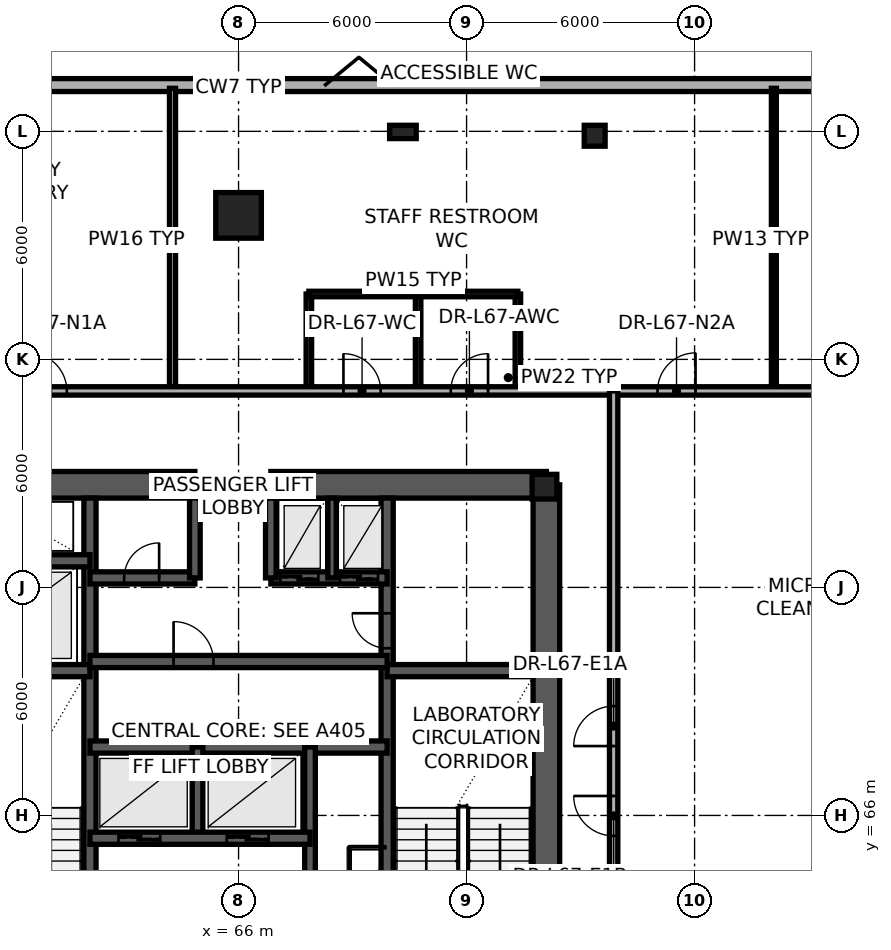
"""IFC4 building model, lengths in metres.
Left out: names, types, materials, properties, quantities, classifications, styles, units other than length and angle.
Written with IfcOpenShell. Run it as: python <this file> out.ifc"""

import sys

from ifc_helpers import new_model, si_unit, direction, frame, frame_2d, origin, origin_2d, place, context, subcontext, project, spatial, rectangle, extrude, element, fill, save


model = new_model("IFC4")
c1 = context("Model", 3, precision=1e-05, world=origin(), true_north=direction((0.0, 1.0)))
c2 = subcontext(c1, "Body", "Model", "MODEL_VIEW")
j1 = project(units=[si_unit("LENGTHUNIT", "METRE"), si_unit("PLANEANGLEUNIT", "RADIAN")], contexts=[c1])
p1 = place(None, origin())
s1 = spatial("IfcSite", under=j1, at=p1, CompositionType="ELEMENT")
p2 = place(p1, origin())
s2 = spatial("IfcBuilding", under=s1, at=p2, CompositionType="ELEMENT")
p3 = place(p2, frame((0.0, 0.0, 253.5)))
s3 = spatial("IfcBuildingStorey", under=s2, at=p3, CompositionType="ELEMENT", Elevation=253.5)
p4 = place(p3, frame((74.1, 61.3, 0.0), z_axis=(0.0, 0.0, 1.0), x_axis=(0.0, 1.0, 0.0)))
e1 = element("IfcWall", 1, at=p4, inside=s3, PredefinedType="SHEAR", context=c2, shape_type="SweptSolid", body=[
    extrude(rectangle(XDim=13.4, YDim=0.7, at=frame_2d((6.7, 0.0))), origin(), (0.0, 0.0, 1.0), 3.65),
])
p5 = place(p3, frame((74.1, 74.7, 0.0), z_axis=(0.0, 0.0, 1.0), x_axis=(-1.0, 0.0, 0.0)))
e2 = element("IfcWall", 2, at=p5, inside=s3, PredefinedType="SHEAR", context=c2, shape_type="SweptSolid", body=[
    extrude(rectangle(XDim=7.25, YDim=0.7, at=frame_2d((3.625, 0.0))), origin(), (0.0, 0.0, 1.0), 3.65),
])
p6 = place(p3, frame((64.85, 74.7, 0.0), z_axis=(0.0, 0.0, 1.0), x_axis=(-1.0, 0.0, 0.0)))
e3 = element("IfcWall", 3, at=p6, inside=s3, PredefinedType="SHEAR", context=c2, shape_type="SweptSolid", body=[
    extrude(rectangle(XDim=6.95, YDim=0.7, at=frame_2d((3.475, 0.0))), origin(), (0.0, 0.0, 1.0), 3.65),
])
p7 = place(p3, frame((62.09, 61.65, 0.0), z_axis=(0.0, 0.0, 1.0), x_axis=(0.0, 1.0, 0.0)))
e4 = element("IfcWall", 4, at=p7, inside=s3, PredefinedType="SHEAR", context=c2, shape_type="SweptSolid", body=[
    extrude(rectangle(XDim=12.7, YDim=0.32, at=frame_2d((6.35, 0.0))), origin(), (0.0, 0.0, 1.0), 3.65),
])
p8 = place(p7, frame((0.55, 0.0, 0.0)))
e5 = element("IfcOpeningElement", 5, at=p8, cuts=e4, PredefinedType="OPENING", context=c2, shape_type="SweptSolid", body=[
    extrude(rectangle(XDim=1.15, YDim=2.15, at=frame_2d((0.575, 1.075))), frame((0.0, 0.17, 0.0), z_axis=(0.0, -1.0, 0.0), x_axis=(1.0, 0.0, 0.0)), (0.0, 0.0, 1.0), 0.34),
])
p9 = place(p3, frame((69.91, 61.65, 0.0), z_axis=(0.0, 0.0, 1.0), x_axis=(0.0, 1.0, 0.0)))
e6 = element("IfcWall", 6, at=p9, inside=s3, PredefinedType="SHEAR", context=c2, shape_type="SweptSolid", body=[
    extrude(rectangle(XDim=12.7, YDim=0.32, at=frame_2d((6.35, 0.0))), origin(), (0.0, 0.0, 1.0), 3.65),
])
p10 = place(p9, frame((8.75, 0.0, 0.0)))
e7 = element("IfcOpeningElement", 7, at=p10, cuts=e6, PredefinedType="OPENING", context=c2, shape_type="SweptSolid", body=[
    extrude(rectangle(XDim=0.92, YDim=2.05, at=frame_2d((0.46, 1.025))), frame((0.0, 0.17, 0.0), z_axis=(0.0, -1.0, 0.0), x_axis=(1.0, 0.0, 0.0)), (0.0, 0.0, 1.0), 0.34),
])
for number, where, z_axis, x_axis in (
    (8, (58.25, 69.81, 0.0), (0.0, 0.0, 1.0), (1.0, 0.0, 0.0)),
    (9, (69.91, 69.81, 0.0), (0.0, 0.0, 1.0), (1.0, 0.0, 0.0)),
    (10, (58.25, 72.7, 0.0), (0.0, 0.0, 1.0), (1.0, 0.0, 0.0)),
):
    element("IfcWall", number, at=place(p3, frame(where, z_axis=z_axis, x_axis=x_axis)), inside=s3, PredefinedType="SHEAR", context=c2, shape_type="SweptSolid", body=[
        extrude(rectangle(XDim=3.84, YDim=0.32, at=frame_2d((1.92, 0.0))), origin(), (0.0, 0.0, 1.0), 3.65),
    ])
p11 = place(p3, frame((62.09, 67.8, 0.0), z_axis=(0.0, 0.0, 1.0), x_axis=(1.0, 0.0, 0.0)))
e11 = element("IfcWall", 11, at=p11, inside=s3, PredefinedType="SHEAR", context=c2, shape_type="SweptSolid", body=[
    extrude(rectangle(XDim=7.82, YDim=0.32, at=frame_2d((3.91, 0.0))), origin(), (0.0, 0.0, 1.0), 3.65),
])
p12 = place(p3, frame((64.92, 65.4, 0.0), z_axis=(0.0, 0.0, 1.0), x_axis=(0.0, 1.0, 0.0)))
e12 = element("IfcWall", 12, at=p12, inside=s3, PredefinedType="SHEAR", context=c2, shape_type="SweptSolid", body=[
    extrude(rectangle(XDim=2.4, YDim=0.28, at=frame_2d((1.2, 0.0))), origin(), (0.0, 0.0, 1.0), 3.65),
])
p13 = place(p3, frame((62.09, 70.05, 0.0), z_axis=(0.0, 0.0, 1.0), x_axis=(1.0, 0.0, 0.0)))
e13 = element("IfcWall", 13, at=p13, inside=s3, PredefinedType="SHEAR", context=c2, shape_type="SweptSolid", body=[
    extrude(rectangle(XDim=7.82, YDim=0.32, at=frame_2d((3.91, 0.0))), origin(), (0.0, 0.0, 1.0), 3.65),
])
p14 = place(p13, frame((2.2, 0.0, 0.0)))
e14 = element("IfcOpeningElement", 14, at=p14, cuts=e13, PredefinedType="OPENING", context=c2, shape_type="SweptSolid", body=[
    extrude(rectangle(XDim=1.05, YDim=2.15, at=frame_2d((0.525, 1.075))), frame((0.0, 0.17, 0.0), z_axis=(0.0, -1.0, 0.0), x_axis=(1.0, 0.0, 0.0)), (0.0, 0.0, 1.0), 0.34),
])
p15 = place(p3, frame((62.09, 72.25, 0.0), z_axis=(0.0, 0.0, 1.0), x_axis=(1.0, 0.0, 0.0)))
e15 = element("IfcWall", 15, at=p15, inside=s3, PredefinedType="SHEAR", context=c2, shape_type="SweptSolid", body=[
    extrude(rectangle(XDim=2.76, YDim=0.32, at=frame_2d((1.38, 0.0))), origin(), (0.0, 0.0, 1.0), 3.65),
])
p16 = place(p15, frame((0.9, 0.0, 0.0)))
e16 = element("IfcOpeningElement", 16, at=p16, cuts=e15, PredefinedType="OPENING", context=c2, shape_type="SweptSolid", body=[
    extrude(rectangle(XDim=0.92, YDim=2.05, at=frame_2d((0.46, 1.025))), frame((0.0, 0.17, 0.0), z_axis=(0.0, -1.0, 0.0), x_axis=(1.0, 0.0, 0.0)), (0.0, 0.0, 1.0), 0.34),
])
p17 = place(p3, frame((66.85, 72.25, 0.0), z_axis=(0.0, 0.0, 1.0), x_axis=(1.0, 0.0, 0.0)))
e17 = element("IfcWall", 17, at=p17, inside=s3, PredefinedType="SHEAR", context=c2, shape_type="SweptSolid", body=[
    extrude(rectangle(XDim=3.06, YDim=0.32, at=frame_2d((1.53, 0.0))), origin(), (0.0, 0.0, 1.0), 3.65),
])
p18 = place(p17, frame((0.25, 0.0, 0.0)))
e18 = element("IfcOpeningElement", 18, at=p18, cuts=e17, PredefinedType="OPENING", context=c2, shape_type="SweptSolid", body=[
    extrude(rectangle(XDim=1.0, YDim=2.2, at=frame_2d((0.5, 1.1))), frame((0.0, 0.17, 0.0), z_axis=(0.0, -1.0, 0.0), x_axis=(1.0, 0.0, 0.0)), (0.0, 0.0, 1.0), 0.34),
])
p19 = place(p17, frame((1.82, 0.0, 0.0)))
e19 = element("IfcOpeningElement", 19, at=p19, cuts=e17, PredefinedType="OPENING", context=c2, shape_type="SweptSolid", body=[
    extrude(rectangle(XDim=1.0, YDim=2.2, at=frame_2d((0.5, 1.1))), frame((0.0, 0.17, 0.0), z_axis=(0.0, -1.0, 0.0), x_axis=(1.0, 0.0, 0.0)), (0.0, 0.0, 1.0), 0.34),
])
for number, where, z_axis, x_axis in (
    (20, (64.85, 72.25, 0.0), (0.0, 0.0, 1.0), (0.0, 1.0, 0.0)),
    (21, (66.85, 72.25, 0.0), (0.0, 0.0, 1.0), (0.0, 1.0, 0.0)),
):
    element("IfcWall", number, at=place(p3, frame(where, z_axis=z_axis, x_axis=x_axis)), inside=s3, PredefinedType="SHEAR", context=c2, shape_type="SweptSolid", body=[
        extrude(rectangle(XDim=2.1, YDim=0.28, at=frame_2d((1.05, 0.0))), origin(), (0.0, 0.0, 1.0), 3.65),
    ])
p20 = place(p3, frame((68.46, 72.25, 0.0), z_axis=(0.0, 0.0, 1.0), x_axis=(0.0, 1.0, 0.0)))
e22 = element("IfcWall", 22, at=p20, inside=s3, PredefinedType="SHEAR", context=c2, shape_type="SweptSolid", body=[
    extrude(rectangle(XDim=2.1, YDim=0.22, at=frame_2d((1.05, 0.0))), origin(), (0.0, 0.0, 1.0), 3.65),
])
p21 = place(p3, frame((67.88, 61.65, 0.0), z_axis=(0.0, 0.0, 1.0), x_axis=(0.0, 1.0, 0.0)))
e23 = element("IfcWall", 23, at=p21, inside=s3, PredefinedType="SHEAR", context=c2, shape_type="SweptSolid", body=[
    extrude(rectangle(XDim=6.15, YDim=0.28, at=frame_2d((3.075, 0.0))), origin(), (0.0, 0.0, 1.0), 3.65),
])
p22 = place(p21, frame((1.1, 0.0, 0.0)))
e24 = element("IfcOpeningElement", 24, at=p22, cuts=e23, PredefinedType="OPENING", context=c2, shape_type="SweptSolid", body=[
    extrude(rectangle(XDim=0.92, YDim=2.05, at=frame_2d((0.46, 1.025))), frame((0.0, 0.15, 0.0), z_axis=(0.0, -1.0, 0.0), x_axis=(1.0, 0.0, 0.0)), (0.0, 0.0, 1.0), 0.3),
])
p23 = place(p3, frame((62.09, 65.4, 0.0), z_axis=(0.0, 0.0, 1.0), x_axis=(1.0, 0.0, 0.0)))
e25 = element("IfcWall", 25, at=p23, inside=s3, PredefinedType="SHEAR", context=c2, shape_type="SweptSolid", body=[
    extrude(rectangle(XDim=5.79, YDim=0.32, at=frame_2d((2.895, 0.0))), origin(), (0.0, 0.0, 1.0), 3.65),
])
p24 = place(p23, frame((0.75, 0.0, 0.0)))
e26 = element("IfcOpeningElement", 26, at=p24, cuts=e25, PredefinedType="OPENING", context=c2, shape_type="SweptSolid", body=[
    extrude(rectangle(XDim=1.1, YDim=2.2, at=frame_2d((0.55, 1.1))), frame((0.0, 0.17, 0.0), z_axis=(0.0, -1.0, 0.0), x_axis=(1.0, 0.0, 0.0)), (0.0, 0.0, 1.0), 0.34),
])
p25 = place(p23, frame((3.6, 0.0, 0.0)))
e27 = element("IfcOpeningElement", 27, at=p25, cuts=e25, PredefinedType="OPENING", context=c2, shape_type="SweptSolid", body=[
    extrude(rectangle(XDim=1.1, YDim=2.2, at=frame_2d((0.55, 1.1))), frame((0.0, 0.17, 0.0), z_axis=(0.0, -1.0, 0.0), x_axis=(1.0, 0.0, 0.0)), (0.0, 0.0, 1.0), 0.34),
])
p26 = place(p3, frame((74.05, 74.65, 0.0), z_axis=(0.0, 0.0, 1.0), x_axis=(1.0, 0.0, 0.0)))
e28 = element("IfcColumn", 28, at=p26, inside=s3, PredefinedType="COLUMN", context=c2, shape_type="SweptSolid", body=[
    extrude(rectangle(XDim=0.65, YDim=0.65, at=origin_2d()), origin(), (0.0, 0.0, 1.0), 3.65),
])
p27 = place(p3, frame((66.0, 81.789, 0.0), z_axis=(0.0, 0.0, 1.0), x_axis=(1.0, 0.0, 0.0)))
e29 = element("IfcColumn", 29, at=p27, inside=s3, PredefinedType="COLUMN", context=c2, shape_type="SweptSolid", body=[
    extrude(rectangle(XDim=1.2, YDim=1.2, at=origin_2d()), origin(), (0.0, 0.0, 1.0), 3.65),
])
p28 = place(p3, frame((75.42, 83.946, 0.003), z_axis=(-0.026841076243, -0.033534611465, 0.999077067328), x_axis=(-0.780716755404, 0.624885067698, 0.0)))
e30 = element("IfcColumn", 30, at=p28, inside=s3, PredefinedType="COLUMN", context=c2, shape_type="SweptSolid", body=[
    extrude(rectangle(XDim=0.55, YDim=0.55, at=origin_2d()), origin(), (0.0, 0.0, 1.0), 3.647),
])
p29 = place(p3, frame((70.348, 84.046, 0.003), z_axis=(-0.012386525043, -0.033611003089, 0.999358231301), x_axis=(-0.938311200574, 0.345791976307, 0.0)))
e31 = element("IfcColumn", 31, at=p29, inside=s3, PredefinedType="PILASTER", context=c2, shape_type="SweptSolid", body=[
    extrude(rectangle(XDim=0.7, YDim=0.35, at=origin_2d()), origin(), (0.0, 0.0, 1.0), 3.646),
])
p30 = place(p3, frame((47.696, 85.218, 0.0), z_axis=(0.0, 0.0, 1.0), x_axis=(1.0, 0.0, 0.0)))
e32 = element("IfcWall", 32, at=p30, inside=s3, PredefinedType="STANDARD", context=c2, shape_type="SweptSolid", body=[
    extrude(rectangle(XDim=36.607, YDim=0.34, at=frame_2d((18.304, 0.0))), origin(), (0.0, 0.0, 1.0), 0.85),
])
p31 = place(p3, frame((61.229, 35.702, 0.0), z_axis=(0.0, 0.0, 1.0), x_axis=(-0.397532587454, 0.917588056762, 0.0)))
e33 = element("IfcWall", 33, at=p31, inside=s3, PredefinedType="STANDARD", context=c2, shape_type="SweptSolid", body=[
    extrude(rectangle(XDim=46.043, YDim=0.34, at=frame_2d((23.021, 0.0))), origin(), (0.0, 0.0, 1.0), 0.85),
])
p32 = place(p3, frame((67.85, 77.17, 0.0), z_axis=(0.0, 0.0, 1.0), x_axis=(0.0, 1.0, 0.0)))
e34 = element("IfcWall", 34, at=p32, inside=s3, PredefinedType="PARTITIONING", context=c2, shape_type="SweptSolid", body=[
    extrude(rectangle(XDim=2.55, YDim=0.145, at=frame_2d((1.275, 0.0))), origin(), (0.0, 0.0, 1.0), 3.4),
])
p33 = place(p3, frame((70.725, 77.17, 0.0), z_axis=(0.0, 0.0, 1.0), x_axis=(0.0, 1.0, 0.0)))
e35 = element("IfcWall", 35, at=p33, inside=s3, PredefinedType="PARTITIONING", context=c2, shape_type="SweptSolid", body=[
    extrude(rectangle(XDim=2.55, YDim=0.145, at=frame_2d((1.275, 0.0))), origin(), (0.0, 0.0, 1.0), 2.83),
])
p34 = place(p3, frame((73.35, 77.17, 0.0), z_axis=(0.0, 0.0, 1.0), x_axis=(0.0, 1.0, 0.0)))
e36 = element("IfcWall", 36, at=p34, inside=s3, PredefinedType="PARTITIONING", context=c2, shape_type="SweptSolid", body=[
    extrude(rectangle(XDim=2.55, YDim=0.145, at=frame_2d((1.275, 0.0))), origin(), (0.0, 0.0, 1.0), 3.4),
])
p35 = place(p3, frame((67.85, 79.72, 0.0), z_axis=(0.0, 0.0, 1.0), x_axis=(1.0, 0.0, 0.0)))
e37 = element("IfcWall", 37, at=p35, inside=s3, PredefinedType="PARTITIONING", context=c2, shape_type="SweptSolid", body=[
    extrude(rectangle(XDim=5.5, YDim=0.145, at=frame_2d((2.75, 0.0))), origin(), (0.0, 0.0, 1.0), 2.83),
])
p36 = place(p3, frame((64.262, 77.17, 0.0), z_axis=(0.0, 0.0, 1.0), x_axis=(0.0, 1.0, 0.0)))
e38 = element("IfcWall", 38, at=p36, inside=s3, PredefinedType="PARTITIONING", context=c2, shape_type="SweptSolid", body=[
    extrude(rectangle(XDim=7.963, YDim=0.16, at=frame_2d((3.981, 0.0))), origin(), (0.0, 0.0, 1.0), 2.68),
])
p37 = place(p3, frame((80.086, 77.17, 0.0), z_axis=(0.0, 0.0, 1.0), x_axis=(0.0, 1.0, 0.0)))
e39 = element("IfcWall", 39, at=p37, inside=s3, PredefinedType="PARTITIONING", context=c2, shape_type="SweptSolid", body=[
    extrude(rectangle(XDim=7.963, YDim=0.13, at=frame_2d((3.981, 0.0))), origin(), (0.0, 0.0, 1.0), 2.68),
])
p38 = place(p3, frame((57.55, 77.17, 0.0), z_axis=(0.0, 0.0, 1.0), x_axis=(1.0, 0.0, 0.0)))
e40 = element("IfcWall", 40, at=p38, inside=s3, PredefinedType="PARTITIONING", context=c2, shape_type="SweptSolid", body=[
    extrude(rectangle(XDim=31.094, YDim=0.22, at=frame_2d((15.547, 0.0))), origin(), (0.0, 0.0, 1.0), 2.68),
])
p39 = place(p38, frame((11.21, 0.0, 0.0)))
e41 = element("IfcOpeningElement", 41, at=p39, cuts=e40, PredefinedType="OPENING", context=c2, shape_type="SweptSolid", body=[
    extrude(rectangle(XDim=0.98, YDim=2.1, at=frame_2d((0.49, 1.05))), frame((0.0, 0.12, 0.0), z_axis=(0.0, -1.0, 0.0), x_axis=(1.0, 0.0, 0.0)), (0.0, 0.0, 1.0), 0.24),
])
p40 = place(p38, frame((14.035, 0.0, 0.0)))
e42 = element("IfcOpeningElement", 42, at=p40, cuts=e40, PredefinedType="OPENING", context=c2, shape_type="SweptSolid", body=[
    extrude(rectangle(XDim=0.98, YDim=2.1, at=frame_2d((0.49, 1.05))), frame((0.0, 0.12, 0.0), z_axis=(0.0, -1.0, 0.0), x_axis=(1.0, 0.0, 0.0)), (0.0, 0.0, 1.0), 0.24),
])
p41 = place(p38, frame((2.931, 0.0, 0.0)))
e43 = element("IfcOpeningElement", 43, at=p41, cuts=e40, PredefinedType="OPENING", context=c2, shape_type="SweptSolid", body=[
    extrude(rectangle(XDim=1.0, YDim=2.1, at=frame_2d((0.5, 1.05))), frame((0.0, 0.12, 0.0), z_axis=(0.0, -1.0, 0.0), x_axis=(1.0, 0.0, 0.0)), (0.0, 0.0, 1.0), 0.24),
])
p42 = place(p38, frame((19.475, 0.0, 0.0)))
e44 = element("IfcOpeningElement", 44, at=p42, cuts=e40, PredefinedType="OPENING", context=c2, shape_type="SweptSolid", body=[
    extrude(rectangle(XDim=1.0, YDim=2.1, at=frame_2d((0.5, 1.05))), frame((0.0, 0.12, 0.0), z_axis=(0.0, -1.0, 0.0), x_axis=(1.0, 0.0, 0.0)), (0.0, 0.0, 1.0), 0.24),
])
p43 = place(p38, frame((26.24, 0.0, 0.0)))
e45 = element("IfcOpeningElement", 45, at=p43, cuts=e40, PredefinedType="OPENING", context=c2, shape_type="SweptSolid", body=[
    extrude(rectangle(XDim=1.0, YDim=2.1, at=frame_2d((0.5, 1.05))), frame((0.0, 0.12, 0.0), z_axis=(0.0, -1.0, 0.0), x_axis=(1.0, 0.0, 0.0)), (0.0, 0.0, 1.0), 0.24),
])
p44 = place(p3, frame((75.87, 53.595, 0.0), z_axis=(0.0, 0.0, 1.0), x_axis=(0.0, 1.0, 0.0)))
e46 = element("IfcWall", 46, at=p44, inside=s3, PredefinedType="PARTITIONING", context=c2, shape_type="SweptSolid", body=[
    extrude(rectangle(XDim=23.574, YDim=0.22, at=frame_2d((11.787, 0.0))), origin(), (0.0, 0.0, 1.0), 2.83),
])
p45 = place(p44, frame((14.23, 0.0, 0.0)))
e47 = element("IfcOpeningElement", 47, at=p45, cuts=e46, PredefinedType="OPENING", context=c2, shape_type="SweptSolid", body=[
    extrude(rectangle(XDim=1.05, YDim=2.15, at=frame_2d((0.525, 1.075))), frame((0.0, 0.12, 0.0), z_axis=(0.0, -1.0, 0.0), x_axis=(1.0, 0.0, 0.0)), (0.0, 0.0, 1.0), 0.24),
])
p46 = place(p44, frame((11.867, 0.0, 0.0)))
e48 = element("IfcOpeningElement", 48, at=p46, cuts=e46, PredefinedType="OPENING", context=c2, shape_type="SweptSolid", body=[
    extrude(rectangle(XDim=1.05, YDim=2.15, at=frame_2d((0.525, 1.075))), frame((0.0, 0.12, 0.0), z_axis=(0.0, -1.0, 0.0), x_axis=(1.0, 0.0, 0.0)), (0.0, 0.0, 1.0), 0.24),
])
p47 = place(p24, origin())
e49 = element("IfcDoor", 49, at=p47, inside=s3, OperationType="SLIDING_TO_LEFT", PredefinedType="DOOR", context=c2, shape_type="SweptSolid", body=[
    extrude(rectangle(XDim=1.1, YDim=2.2, at=frame_2d((0.55, 1.1))), frame((0.0, 0.025, 0.0), z_axis=(0.0, -1.0, 0.0), x_axis=(1.0, 0.0, 0.0)), (0.0, 0.0, 1.0), 0.05),
])
fill(e26, e49)
p48 = place(p25, origin())
e50 = element("IfcDoor", 50, at=p48, inside=s3, OperationType="SLIDING_TO_LEFT", PredefinedType="DOOR", context=c2, shape_type="SweptSolid", body=[
    extrude(rectangle(XDim=1.1, YDim=2.2, at=frame_2d((0.55, 1.1))), frame((0.0, 0.025, 0.0), z_axis=(0.0, -1.0, 0.0), x_axis=(1.0, 0.0, 0.0)), (0.0, 0.0, 1.0), 0.05),
])
fill(e27, e50)
p49 = place(p14, origin())
e51 = element("IfcDoor", 51, at=p49, inside=s3, OperationType="SINGLE_SWING_LEFT", PredefinedType="DOOR", context=c2, shape_type="SweptSolid", body=[
    extrude(rectangle(XDim=1.05, YDim=2.15, at=frame_2d((0.525, 1.075))), frame((0.0, 0.025, 0.0), z_axis=(0.0, -1.0, 0.0), x_axis=(1.0, 0.0, 0.0)), (0.0, 0.0, 1.0), 0.05),
])
fill(e14, e51)
p50 = place(p16, origin())
e52 = element("IfcDoor", 52, at=p50, inside=s3, OperationType="SINGLE_SWING_RIGHT", PredefinedType="DOOR", context=c2, shape_type="SweptSolid", body=[
    extrude(rectangle(XDim=0.92, YDim=2.05, at=frame_2d((0.46, 1.025))), frame((0.0, 0.025, 0.0), z_axis=(0.0, -1.0, 0.0), x_axis=(1.0, 0.0, 0.0)), (0.0, 0.0, 1.0), 0.05),
])
fill(e16, e52)
p51 = place(p18, origin())
e53 = element("IfcDoor", 53, at=p51, inside=s3, OperationType="SLIDING_TO_LEFT", PredefinedType="DOOR", context=c2, shape_type="SweptSolid", body=[
    extrude(rectangle(XDim=1.0, YDim=2.2, at=frame_2d((0.5, 1.1))), frame((0.0, 0.025, 0.0), z_axis=(0.0, -1.0, 0.0), x_axis=(1.0, 0.0, 0.0)), (0.0, 0.0, 1.0), 0.05),
])
fill(e18, e53)
p52 = place(p19, origin())
e54 = element("IfcDoor", 54, at=p52, inside=s3, OperationType="SLIDING_TO_LEFT", PredefinedType="DOOR", context=c2, shape_type="SweptSolid", body=[
    extrude(rectangle(XDim=1.0, YDim=2.2, at=frame_2d((0.5, 1.1))), frame((0.0, 0.025, 0.0), z_axis=(0.0, -1.0, 0.0), x_axis=(1.0, 0.0, 0.0)), (0.0, 0.0, 1.0), 0.05),
])
fill(e19, e54)
p53 = place(p10, origin())
e55 = element("IfcDoor", 55, at=p53, inside=s3, OperationType="SINGLE_SWING_RIGHT", PredefinedType="DOOR", context=c2, shape_type="SweptSolid", body=[
    extrude(rectangle(XDim=0.92, YDim=2.05, at=frame_2d((0.46, 1.025))), frame((0.0, 0.025, 0.0), z_axis=(0.0, -1.0, 0.0), x_axis=(1.0, 0.0, 0.0)), (0.0, 0.0, 1.0), 0.05),
])
fill(e7, e55)
p54 = place(p39, origin())
e56 = element("IfcDoor", 56, at=p54, inside=s3, OperationType="SINGLE_SWING_LEFT", PredefinedType="DOOR", context=c2, shape_type="SweptSolid", body=[
    extrude(rectangle(XDim=0.98, YDim=2.1, at=frame_2d((0.49, 1.05))), frame((0.0, 0.025, 0.0), z_axis=(0.0, -1.0, 0.0), x_axis=(1.0, 0.0, 0.0)), (0.0, 0.0, 1.0), 0.05),
])
fill(e41, e56)
p55 = place(p40, origin())
e57 = element("IfcDoor", 57, at=p55, inside=s3, OperationType="SINGLE_SWING_RIGHT", PredefinedType="DOOR", context=c2, shape_type="SweptSolid", body=[
    extrude(rectangle(XDim=0.98, YDim=2.1, at=frame_2d((0.49, 1.05))), frame((0.0, 0.025, 0.0), z_axis=(0.0, -1.0, 0.0), x_axis=(1.0, 0.0, 0.0)), (0.0, 0.0, 1.0), 0.05),
])
fill(e42, e57)
p56 = place(p41, origin())
e58 = element("IfcDoor", 58, at=p56, inside=s3, OperationType="SINGLE_SWING_LEFT", PredefinedType="DOOR", context=c2, shape_type="SweptSolid", body=[
    extrude(rectangle(XDim=1.0, YDim=2.1, at=frame_2d((0.5, 1.05))), frame((0.0, 0.025, 0.0), z_axis=(0.0, -1.0, 0.0), x_axis=(1.0, 0.0, 0.0)), (0.0, 0.0, 1.0), 0.05),
])
fill(e43, e58)
p57 = place(p42, origin())
e59 = element("IfcDoor", 59, at=p57, inside=s3, OperationType="SINGLE_SWING_RIGHT", PredefinedType="DOOR", context=c2, shape_type="SweptSolid", body=[
    extrude(rectangle(XDim=1.0, YDim=2.1, at=frame_2d((0.5, 1.05))), frame((0.0, 0.025, 0.0), z_axis=(0.0, -1.0, 0.0), x_axis=(1.0, 0.0, 0.0)), (0.0, 0.0, 1.0), 0.05),
])
fill(e44, e59)
p58 = place(p45, origin())
e60 = element("IfcDoor", 60, at=p58, inside=s3, OperationType="SINGLE_SWING_LEFT", PredefinedType="DOOR", context=c2, shape_type="SweptSolid", body=[
    extrude(rectangle(XDim=1.05, YDim=2.15, at=frame_2d((0.525, 1.075))), frame((0.0, 0.025, 0.0), z_axis=(0.0, -1.0, 0.0), x_axis=(1.0, 0.0, 0.0)), (0.0, 0.0, 1.0), 0.05),
])
fill(e47, e60)
p59 = place(p46, origin())
e61 = element("IfcDoor", 61, at=p59, inside=s3, OperationType="SINGLE_SWING_RIGHT", PredefinedType="DOOR", context=c2, shape_type="SweptSolid", body=[
    extrude(rectangle(XDim=1.05, YDim=2.15, at=frame_2d((0.525, 1.075))), frame((0.0, 0.025, 0.0), z_axis=(0.0, -1.0, 0.0), x_axis=(1.0, 0.0, 0.0)), (0.0, 0.0, 1.0), 0.05),
])
fill(e48, e61)
save(model, sys.argv[1])
